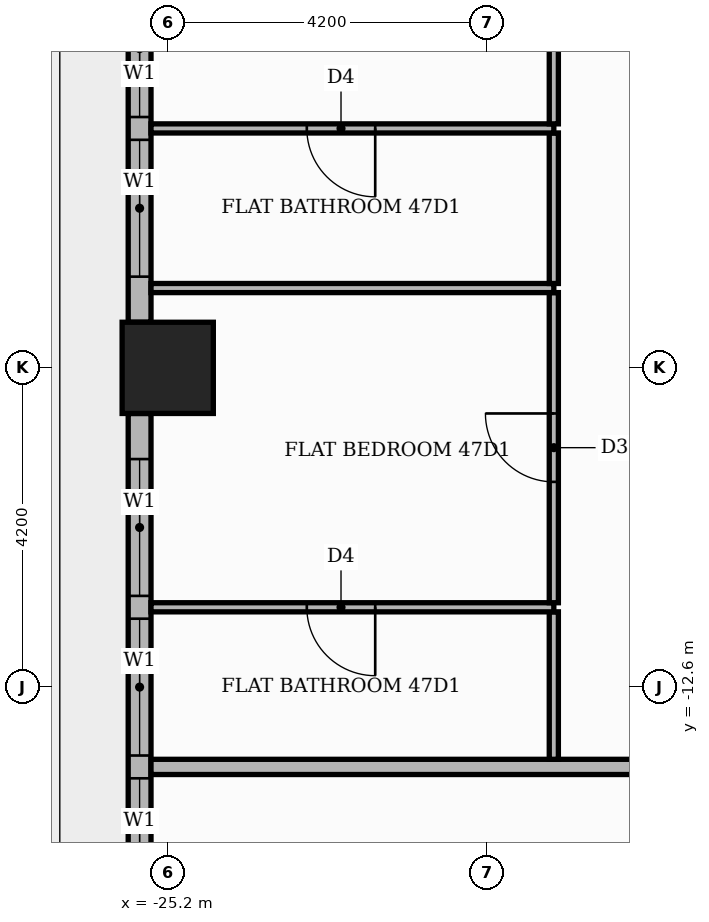
"""IFC4 building model, lengths in metres.
Left out: names, types, materials, properties, quantities, classifications, styles, units other than length and angle.
Written with IfcOpenShell. Run it as: python <this file> out.ifc"""

import sys

from ifc_helpers import new_model, si_unit, direction, frame, frame_2d, origin, origin_2d, place, context, subcontext, project, spatial, rectangle, extrude, element, fill, save


model = new_model("IFC4")
c1 = context("Model", 3, precision=1e-05, world=origin(), true_north=direction((0.0, 1.0)))
c2 = subcontext(c1, "Body", "Model", "MODEL_VIEW")
j1 = project(units=[si_unit("LENGTHUNIT", "METRE"), si_unit("PLANEANGLEUNIT", "RADIAN")], contexts=[c1])
p1 = place(None, origin())
s1 = spatial("IfcSite", under=j1, at=p1, CompositionType="ELEMENT")
p2 = place(p1, origin())
s2 = spatial("IfcBuilding", under=s1, at=p2, CompositionType="ELEMENT")
p3 = place(p2, frame((0.0, 0.0, 200.1)))
s3 = spatial("IfcBuildingStorey", under=s2, at=p3, CompositionType="ELEMENT", Elevation=200.1)
p4 = place(p3, frame((-25.2, -8.4, 0.0), z_axis=(0.0, 0.0, 1.0), x_axis=(1.0, 0.0, 0.0)))
e1 = element("IfcColumn", 1, at=p4, inside=s3, PredefinedType="COLUMN", context=c2, shape_type="SweptSolid", body=[
    extrude(rectangle(XDim=1.2, YDim=1.2, at=origin_2d()), origin(), (0.0, 0.0, 1.0), 3.9),
])
p5 = place(p3, frame((-25.57, -0.6, 0.0), z_axis=(0.0, 0.0, 1.0), x_axis=(0.0, -1.0, 0.0)))
e2 = element("IfcWall", 2, at=p5, inside=s3, PredefinedType="STANDARD", context=c2, shape_type="SweptSolid", body=[
    extrude(rectangle(XDim=7.2, YDim=0.3, at=frame_2d((3.6, 0.0))), origin(), (0.0, 0.0, 1.0), 3.48),
])
p6 = place(p5, frame((0.6, 0.0, 0.0)))
e3 = element("IfcOpeningElement", 3, at=p6, cuts=e2, PredefinedType="OPENING", context=c2, shape_type="SweptSolid", body=[
    extrude(rectangle(XDim=1.8, YDim=2.4, at=frame_2d((0.9, 1.2))), frame((0.0, 0.16, 0.0), z_axis=(0.0, -1.0, 0.0), x_axis=(1.0, 0.0, 0.0)), (0.0, 0.0, 1.0), 0.32),
])
p7 = place(p5, frame((2.7, 0.0, 0.9)))
e4 = element("IfcOpeningElement", 4, at=p7, cuts=e2, PredefinedType="OPENING", context=c2, shape_type="SweptSolid", body=[
    extrude(rectangle(XDim=1.8, YDim=2.1, at=frame_2d((0.9, 1.05))), frame((0.0, 0.16, 0.0), z_axis=(0.0, -1.0, 0.0), x_axis=(1.0, 0.0, 0.0)), (0.0, 0.0, 1.0), 0.32),
])
p8 = place(p5, frame((4.8, 0.0, 0.9)))
e5 = element("IfcOpeningElement", 5, at=p8, cuts=e2, PredefinedType="OPENING", context=c2, shape_type="SweptSolid", body=[
    extrude(rectangle(XDim=1.8, YDim=2.1, at=frame_2d((0.9, 1.05))), frame((0.0, 0.16, 0.0), z_axis=(0.0, -1.0, 0.0), x_axis=(1.0, 0.0, 0.0)), (0.0, 0.0, 1.0), 0.32),
])
p9 = place(p3, frame((-25.57, -9.0, 0.0), z_axis=(0.0, 0.0, 1.0), x_axis=(0.0, -1.0, 0.0)))
e6 = element("IfcWall", 6, at=p9, inside=s3, PredefinedType="STANDARD", context=c2, shape_type="SweptSolid", body=[
    extrude(rectangle(XDim=7.2, YDim=0.3, at=frame_2d((3.6, 0.0))), origin(), (0.0, 0.0, 1.0), 3.48),
])
p10 = place(p9, frame((0.6, 0.0, 0.9)))
e7 = element("IfcOpeningElement", 7, at=p10, cuts=e6, PredefinedType="OPENING", context=c2, shape_type="SweptSolid", body=[
    extrude(rectangle(XDim=1.8, YDim=2.1, at=frame_2d((0.9, 1.05))), frame((0.0, 0.16, 0.0), z_axis=(0.0, -1.0, 0.0), x_axis=(1.0, 0.0, 0.0)), (0.0, 0.0, 1.0), 0.32),
])
p11 = place(p9, frame((2.7, 0.0, 0.9)))
e8 = element("IfcOpeningElement", 8, at=p11, cuts=e6, PredefinedType="OPENING", context=c2, shape_type="SweptSolid", body=[
    extrude(rectangle(XDim=1.8, YDim=2.1, at=frame_2d((0.9, 1.05))), frame((0.0, 0.16, 0.0), z_axis=(0.0, -1.0, 0.0), x_axis=(1.0, 0.0, 0.0)), (0.0, 0.0, 1.0), 0.32),
])
p12 = place(p9, frame((4.8, 0.0, 0.9)))
e9 = element("IfcOpeningElement", 9, at=p12, cuts=e6, PredefinedType="OPENING", context=c2, shape_type="SweptSolid", body=[
    extrude(rectangle(XDim=1.8, YDim=2.1, at=frame_2d((0.9, 1.05))), frame((0.0, 0.16, 0.0), z_axis=(0.0, -1.0, 0.0), x_axis=(1.0, 0.0, 0.0)), (0.0, 0.0, 1.0), 0.32),
])
p13 = place(p3, frame((-25.42, -13.65, 0.0), z_axis=(0.0, 0.0, 1.0), x_axis=(1.0, 0.0, 0.0)))
e10 = element("IfcWall", 10, at=p13, inside=s3, PredefinedType="PARTITIONING", context=c2, shape_type="SweptSolid", body=[
    extrude(rectangle(XDim=39.07, YDim=0.2, at=frame_2d((19.535, 0.0))), origin(), (0.0, 0.0, 1.0), 3.48),
])
p14 = place(p13, frame((14.37, 0.0, 0.0)))
e11 = element("IfcOpeningElement", 11, at=p14, cuts=e10, PredefinedType="OPENING", context=c2, shape_type="SweptSolid", body=[
    extrude(rectangle(XDim=1.1, YDim=2.4, at=frame_2d((0.55, 1.2))), frame((0.0, 0.11, 0.0), z_axis=(0.0, -1.0, 0.0), x_axis=(1.0, 0.0, 0.0)), (0.0, 0.0, 1.0), 0.22),
])
p15 = place(p3, frame((-20.12, -13.55, 0.0), z_axis=(0.0, 0.0, 1.0), x_axis=(0.0, 1.0, 0.0)))
e12 = element("IfcWall", 12, at=p15, inside=s3, PredefinedType="PARTITIONING", context=c2, shape_type="SweptSolid", body=[
    extrude(rectangle(XDim=1.94, YDim=0.12, at=frame_2d((0.97, 0.0))), origin(), (0.0, 0.0, 1.0), 3.48),
])
p16 = place(p3, frame((-25.42, -11.55, 0.0), z_axis=(0.0, 0.0, 1.0), x_axis=(1.0, 0.0, 0.0)))
e13 = element("IfcWall", 13, at=p16, inside=s3, PredefinedType="PARTITIONING", context=c2, shape_type="SweptSolid", body=[
    extrude(rectangle(XDim=5.3, YDim=0.12, at=frame_2d((2.65, 0.0))), origin(), (0.0, 0.0, 1.0), 3.48),
])
p17 = place(p16, frame((2.05, 0.0, 0.0)))
e14 = element("IfcOpeningElement", 14, at=p17, cuts=e13, PredefinedType="OPENING", context=c2, shape_type="SweptSolid", body=[
    extrude(rectangle(XDim=0.9, YDim=2.1, at=frame_2d((0.45, 1.05))), frame((0.0, 0.07, 0.0), z_axis=(0.0, -1.0, 0.0), x_axis=(1.0, 0.0, 0.0)), (0.0, 0.0, 1.0), 0.14),
])
p18 = place(p3, frame((-20.12, -11.49, 0.0), z_axis=(0.0, 0.0, 1.0), x_axis=(0.0, 1.0, 0.0)))
e15 = element("IfcWall", 15, at=p18, inside=s3, PredefinedType="PARTITIONING", context=c2, shape_type="SweptSolid", body=[
    extrude(rectangle(XDim=4.08, YDim=0.12, at=frame_2d((2.04, 0.0))), origin(), (0.0, 0.0, 1.0), 3.48),
])
p19 = place(p18, frame((1.59, 0.0, 0.0)))
e16 = element("IfcOpeningElement", 16, at=p19, cuts=e15, PredefinedType="OPENING", context=c2, shape_type="SweptSolid", body=[
    extrude(rectangle(XDim=0.9, YDim=2.1, at=frame_2d((0.45, 1.05))), frame((0.0, 0.07, 0.0), z_axis=(0.0, -1.0, 0.0), x_axis=(1.0, 0.0, 0.0)), (0.0, 0.0, 1.0), 0.14),
])
p20 = place(p3, frame((-25.42, -7.35, 0.0), z_axis=(0.0, 0.0, 1.0), x_axis=(1.0, 0.0, 0.0)))
e17 = element("IfcWall", 17, at=p20, inside=s3, PredefinedType="PARTITIONING", context=c2, shape_type="SweptSolid", body=[
    extrude(rectangle(XDim=5.3, YDim=0.12, at=frame_2d((2.65, 0.0))), origin(), (0.0, 0.0, 1.0), 3.48),
])
p21 = place(p3, frame((-20.12, -7.29, 0.0), z_axis=(0.0, 0.0, 1.0), x_axis=(0.0, 1.0, 0.0)))
e18 = element("IfcWall", 18, at=p21, inside=s3, PredefinedType="PARTITIONING", context=c2, shape_type="SweptSolid", body=[
    extrude(rectangle(XDim=1.98, YDim=0.12, at=frame_2d((0.99, 0.0))), origin(), (0.0, 0.0, 1.0), 3.48),
])
p22 = place(p3, frame((-25.42, -5.25, 0.0), z_axis=(0.0, 0.0, 1.0), x_axis=(1.0, 0.0, 0.0)))
e19 = element("IfcWall", 19, at=p22, inside=s3, PredefinedType="PARTITIONING", context=c2, shape_type="SweptSolid", body=[
    extrude(rectangle(XDim=5.3, YDim=0.12, at=frame_2d((2.65, 0.0))), origin(), (0.0, 0.0, 1.0), 3.48),
])
p23 = place(p22, frame((2.05, 0.0, 0.0)))
e20 = element("IfcOpeningElement", 20, at=p23, cuts=e19, PredefinedType="OPENING", context=c2, shape_type="SweptSolid", body=[
    extrude(rectangle(XDim=0.9, YDim=2.1, at=frame_2d((0.45, 1.05))), frame((0.0, 0.07, 0.0), z_axis=(0.0, -1.0, 0.0), x_axis=(1.0, 0.0, 0.0)), (0.0, 0.0, 1.0), 0.14),
])
p24 = place(p3, frame((-20.12, -5.19, 0.0), z_axis=(0.0, 0.0, 1.0), x_axis=(0.0, 1.0, 0.0)))
e21 = element("IfcWall", 21, at=p24, inside=s3, PredefinedType="PARTITIONING", context=c2, shape_type="SweptSolid", body=[
    extrude(rectangle(XDim=1.98, YDim=0.12, at=frame_2d((0.99, 0.0))), origin(), (0.0, 0.0, 1.0), 3.48),
])
p25 = place(p7, origin())
e22 = element("IfcWindow", 22, at=p25, inside=s3, PartitioningType="SINGLE_PANEL", PredefinedType="WINDOW", context=c2, shape_type="SweptSolid", body=[
    extrude(rectangle(XDim=1.8, YDim=2.1, at=frame_2d((0.9, 1.05))), frame((0.0, 0.03, 0.0), z_axis=(0.0, -1.0, 0.0), x_axis=(1.0, 0.0, 0.0)), (0.0, 0.0, 1.0), 0.06),
])
fill(e4, e22)
p26 = place(p8, origin())
e23 = element("IfcWindow", 23, at=p26, inside=s3, PartitioningType="SINGLE_PANEL", PredefinedType="WINDOW", context=c2, shape_type="SweptSolid", body=[
    extrude(rectangle(XDim=1.8, YDim=2.1, at=frame_2d((0.9, 1.05))), frame((0.0, 0.03, 0.0), z_axis=(0.0, -1.0, 0.0), x_axis=(1.0, 0.0, 0.0)), (0.0, 0.0, 1.0), 0.06),
])
fill(e5, e23)
p27 = place(p10, origin())
e24 = element("IfcWindow", 24, at=p27, inside=s3, PartitioningType="SINGLE_PANEL", PredefinedType="WINDOW", context=c2, shape_type="SweptSolid", body=[
    extrude(rectangle(XDim=1.8, YDim=2.1, at=frame_2d((0.9, 1.05))), frame((0.0, 0.03, 0.0), z_axis=(0.0, -1.0, 0.0), x_axis=(1.0, 0.0, 0.0)), (0.0, 0.0, 1.0), 0.06),
])
fill(e7, e24)
p28 = place(p11, origin())
e25 = element("IfcWindow", 25, at=p28, inside=s3, PartitioningType="SINGLE_PANEL", PredefinedType="WINDOW", context=c2, shape_type="SweptSolid", body=[
    extrude(rectangle(XDim=1.8, YDim=2.1, at=frame_2d((0.9, 1.05))), frame((0.0, 0.03, 0.0), z_axis=(0.0, -1.0, 0.0), x_axis=(1.0, 0.0, 0.0)), (0.0, 0.0, 1.0), 0.06),
])
fill(e8, e25)
p29 = place(p12, origin())
e26 = element("IfcWindow", 26, at=p29, inside=s3, PartitioningType="SINGLE_PANEL", PredefinedType="WINDOW", context=c2, shape_type="SweptSolid", body=[
    extrude(rectangle(XDim=1.8, YDim=2.1, at=frame_2d((0.9, 1.05))), frame((0.0, 0.03, 0.0), z_axis=(0.0, -1.0, 0.0), x_axis=(1.0, 0.0, 0.0)), (0.0, 0.0, 1.0), 0.06),
])
fill(e9, e26)
p30 = place(p23, frame((0.9, 0.0, 0.0), z_axis=(0.0, 0.0, 1.0), x_axis=(-1.0, 0.0, 0.0)))
e27 = element("IfcDoor", 27, at=p30, inside=s3, OperationType="SINGLE_SWING_RIGHT", PredefinedType="DOOR", context=c2, shape_type="SweptSolid", body=[
    extrude(rectangle(XDim=0.9, YDim=2.1, at=frame_2d((0.45, 1.05))), frame((0.0, 0.025, 0.0), z_axis=(0.0, -1.0, 0.0), x_axis=(1.0, 0.0, 0.0)), (0.0, 0.0, 1.0), 0.05),
])
fill(e20, e27)
p31 = place(p19, origin())
e28 = element("IfcDoor", 28, at=p31, inside=s3, OperationType="SINGLE_SWING_RIGHT", PredefinedType="DOOR", context=c2, shape_type="SweptSolid", body=[
    extrude(rectangle(XDim=0.9, YDim=2.1, at=frame_2d((0.45, 1.05))), frame((0.0, 0.025, 0.0), z_axis=(0.0, -1.0, 0.0), x_axis=(1.0, 0.0, 0.0)), (0.0, 0.0, 1.0), 0.05),
])
fill(e16, e28)
p32 = place(p17, frame((0.9, 0.0, 0.0), z_axis=(0.0, 0.0, 1.0), x_axis=(-1.0, 0.0, 0.0)))
e29 = element("IfcDoor", 29, at=p32, inside=s3, OperationType="SINGLE_SWING_RIGHT", PredefinedType="DOOR", context=c2, shape_type="SweptSolid", body=[
    extrude(rectangle(XDim=0.9, YDim=2.1, at=frame_2d((0.45, 1.05))), frame((0.0, 0.025, 0.0), z_axis=(0.0, -1.0, 0.0), x_axis=(1.0, 0.0, 0.0)), (0.0, 0.0, 1.0), 0.05),
])
fill(e14, e29)
save(model, sys.argv[1])
